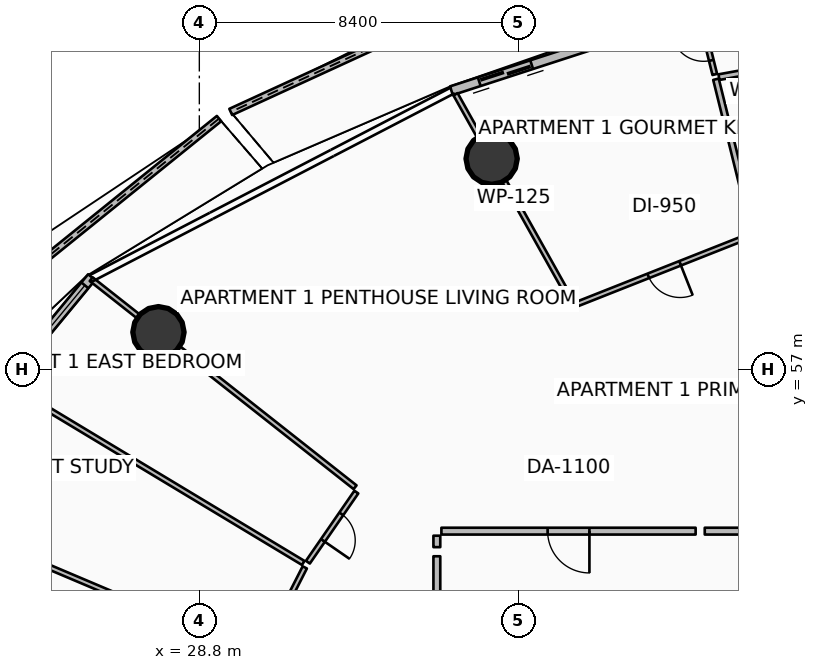
"""IFC4 building model, lengths in metres.
Left out: names, types, materials, properties, quantities, classifications, styles, units other than length and angle.
Written with IfcOpenShell. Run it as: python <this file> out.ifc"""

import sys

from ifc_helpers import new_model, si_unit, direction, frame, frame_2d, origin, origin_2d, place, context, subcontext, project, spatial, polyline, rectangle, circle, outline, extrude, element, fill, save


model = new_model("IFC4")
c1 = context("Model", 3, precision=1e-05, world=origin(), true_north=direction((0.0, 1.0)))
c2 = subcontext(c1, "Body", "Model", "MODEL_VIEW")
j1 = project(units=[si_unit("LENGTHUNIT", "METRE"), si_unit("PLANEANGLEUNIT", "RADIAN")], contexts=[c1])
p1 = place(None, origin())
s1 = spatial("IfcSite", under=j1, at=p1, CompositionType="ELEMENT")
p2 = place(p1, origin())
s2 = spatial("IfcBuilding", under=s1, at=p2, CompositionType="ELEMENT")
p3 = place(p2, frame((0.0, 0.0, 63.9)))
s3 = spatial("IfcBuildingStorey", under=s2, at=p3, CompositionType="ELEMENT", Elevation=63.9)
for number, where, z_axis, x_axis in (
    (1, (36.492, 62.55, 0.0), (0.0, 0.0, 1.0), (1.0, 0.0, 0.0)),
    (2, (27.724, 57.984, 0.0), (0.0, 0.0, 1.0), (1.0, 0.0, 0.0)),
):
    element("IfcColumn", number, at=place(p3, frame(where, z_axis=z_axis, x_axis=x_axis)), inside=s3, PredefinedType="COLUMN", context=c2, shape_type="SweptSolid", body=[
        extrude(circle(Radius=0.675, at=origin_2d()), origin(), (0.0, 0.0, 1.0), 3.5),
    ])
p4 = place(p3, frame((39.347, 68.246, 0.0), z_axis=(0.0, 0.0, 1.0), x_axis=(-0.908702116292, -0.417445162681, 0.0)))
e3 = element("IfcWall", 3, at=p4, inside=s3, PredefinedType="PARAPET", context=c2, shape_type="SweptSolid", body=[
    extrude(outline(polyline([(0.0, 0.0), (10.697, 0.0), (10.697, 1.233), (5.348, 1.418), (0.0, 1.632), (0.0, 0.0)])), frame((0.0, 0.09, 0.0), z_axis=(0.0, -1.0, 0.0), x_axis=(1.0, 0.0, 0.0)), (0.0, 0.0, 1.0), 0.18),
])
p5 = place(p3, frame((29.318, 63.605, 0.0), z_axis=(0.0, 0.0, 1.0), x_axis=(-0.778164801363, -0.628060141961, 0.0)))
e4 = element("IfcWall", 4, at=p5, inside=s3, PredefinedType="PARAPET", context=c2, shape_type="SweptSolid", body=[
    extrude(outline(polyline([(0.0, 0.0), (11.677, 0.0), (11.677, 1.148), (5.838, 1.127), (0.0, 1.224), (0.0, 0.0)])), frame((0.0, 0.09, 0.0), z_axis=(0.0, -1.0, 0.0), x_axis=(1.0, 0.0, 0.0)), (0.0, 0.0, 1.0), 0.18),
])
p6 = place(p3, frame((45.036, 67.458, 0.0), z_axis=(0.0, 0.0, 1.0), x_axis=(-0.951054679225, -0.309022648238, 0.0)))
e5 = element("IfcWall", 5, at=p6, inside=s3, PredefinedType="SOLIDWALL", context=c2, shape_type="SweptSolid", body=[
    extrude(rectangle(XDim=10.097, YDim=0.24, at=frame_2d((5.048, 0.0))), origin(), (0.0, 0.0, 1.0), 2.45),
])
p7 = place(p6, frame((7.877, 0.0, 0.0)))
e6 = element("IfcOpeningElement", 6, at=p7, cuts=e5, PredefinedType="OPENING", context=c2, shape_type="SweptSolid", body=[
    extrude(rectangle(XDim=1.45, YDim=2.15, at=frame_2d((0.725, 1.075))), frame((0.0, 0.13, 0.0), z_axis=(0.0, -1.0, 0.0), x_axis=(1.0, 0.0, 0.0)), (0.0, 0.0, 1.0), 0.26),
])
p8 = place(p6, frame((0.28, 0.0, 0.65)))
e7 = element("IfcOpeningElement", 7, at=p8, cuts=e5, PredefinedType="OPENING", context=c2, shape_type="SweptSolid", body=[
    extrude(rectangle(XDim=1.6, YDim=1.5, at=frame_2d((0.8, 0.75))), frame((0.0, 0.13, 0.0), z_axis=(0.0, -1.0, 0.0), x_axis=(1.0, 0.0, 0.0)), (0.0, 0.0, 1.0), 0.26),
])
p9 = place(p3, frame((25.967, 59.433, 0.0), z_axis=(0.0, 0.0, 1.0), x_axis=(-0.636674332663, -0.771132799281, 0.0)))
e8 = element("IfcWall", 8, at=p9, inside=s3, PredefinedType="SOLIDWALL", context=c2, shape_type="SweptSolid", body=[
    extrude(rectangle(XDim=11.851, YDim=0.24, at=frame_2d((5.926, 0.0))), origin(), (0.0, 0.0, 1.0), 2.45),
])
p10 = place(p9, frame((9.631, 0.0, 0.0)))
e9 = element("IfcOpeningElement", 9, at=p10, cuts=e8, PredefinedType="OPENING", context=c2, shape_type="SweptSolid", body=[
    extrude(rectangle(XDim=1.45, YDim=2.15, at=frame_2d((0.725, 1.075))), frame((0.0, 0.13, 0.0), z_axis=(0.0, -1.0, 0.0), x_axis=(1.0, 0.0, 0.0)), (0.0, 0.0, 1.0), 0.26),
])
p11 = place(p9, frame((0.28, 0.0, 0.65)))
e10 = element("IfcOpeningElement", 10, at=p11, cuts=e8, PredefinedType="OPENING", context=c2, shape_type="SweptSolid", body=[
    extrude(rectangle(XDim=1.6, YDim=1.5, at=frame_2d((0.8, 0.75))), frame((0.0, 0.13, 0.0), z_axis=(0.0, -1.0, 0.0), x_axis=(1.0, 0.0, 0.0)), (0.0, 0.0, 1.0), 0.26),
])
p12 = place(p3, frame((41.86, 52.75, 0.0), z_axis=(0.0, 0.0, 1.0), x_axis=(-1.0, 0.0, 0.0)))
e11 = element("IfcWall", 11, at=p12, inside=s3, PredefinedType="PARTITIONING", context=c2, shape_type="SweptSolid", body=[
    extrude(rectangle(XDim=6.69, YDim=0.18, at=frame_2d((3.345, 0.0))), origin(), (0.0, 0.0, 1.0), 2.867),
])
p13 = place(p12, frame((2.795, 0.0, 0.0)))
e12 = element("IfcOpeningElement", 12, at=p13, cuts=e11, PredefinedType="OPENING", context=c2, shape_type="SweptSolid", body=[
    extrude(rectangle(XDim=1.1, YDim=2.1, at=frame_2d((0.55, 1.05))), frame((0.0, 0.1, 0.0), z_axis=(0.0, -1.0, 0.0), x_axis=(1.0, 0.0, 0.0)), (0.0, 0.0, 1.0), 0.2),
])
p14 = place(p3, frame((35.05, 52.63, 0.0), z_axis=(0.0, 0.0, 1.0), x_axis=(0.0, -1.0, 0.0)))
e13 = element("IfcWall", 13, at=p14, inside=s3, PredefinedType="PARTITIONING", context=c2, shape_type="SweptSolid", body=[
    extrude(rectangle(XDim=0.301, YDim=0.18, at=frame_2d((0.15, 0.0))), origin(), (0.0, 0.0, 1.0), 2.867),
])
p15 = place(p3, frame((46.608, 52.75, 0.0), z_axis=(0.0, 0.0, 1.0), x_axis=(-1.0, 0.0, 0.0)))
e14 = element("IfcWall", 14, at=p15, inside=s3, PredefinedType="PARTITIONING", context=c2, shape_type="SweptSolid", body=[
    extrude(rectangle(XDim=4.508, YDim=0.18, at=frame_2d((2.254, 0.0))), origin(), (0.0, 0.0, 1.0), 2.867),
])
p16 = place(p3, frame((38.604, 58.778, 0.0), z_axis=(0.0, 0.0, 1.0), x_axis=(-0.488617606889, 0.872498042541, 0.0)))
e15 = element("IfcWall", 15, at=p16, inside=s3, PredefinedType="PARTITIONING", context=c2, shape_type="SweptSolid", body=[
    extrude(rectangle(XDim=6.266, YDim=0.125, at=frame_2d((3.133, 0.0))), origin(), (0.0, 0.0, 1.0), 2.867),
])
p17 = place(p3, frame((45.156, 65.184, 0.0), z_axis=(0.0, 0.0, 1.0), x_axis=(-0.983792433056, -0.179311038873, 0.0)))
e16 = element("IfcWall", 16, at=p17, inside=s3, PredefinedType="PARTITIONING", context=c2, shape_type="SweptSolid", body=[
    extrude(rectangle(XDim=2.726, YDim=0.15, at=frame_2d((1.363, 0.0))), origin(), (0.0, 0.0, 1.0), 2.867),
])
p18 = place(p3, frame((43.381, 60.657, 0.0), z_axis=(0.0, 0.0, 1.0), x_axis=(-0.240281337946, 0.97070329073, 0.0)))
e17 = element("IfcWall", 17, at=p18, inside=s3, PredefinedType="PARTITIONING", context=c2, shape_type="SweptSolid", body=[
    extrude(rectangle(XDim=4.104, YDim=0.15, at=frame_2d((2.052, 0.0))), origin(), (0.0, 0.0, 1.0), 2.94),
])
p19 = place(p3, frame((42.364, 64.767, 0.0), z_axis=(0.0, 0.0, 1.0), x_axis=(-0.240399183991, 0.970674112324, 0.0)))
e18 = element("IfcWall", 18, at=p19, inside=s3, PredefinedType="PARTITIONING", context=c2, shape_type="SweptSolid", body=[
    extrude(rectangle(XDim=1.614, YDim=0.125, at=frame_2d((0.807, 0.0))), origin(), (0.0, 0.0, 1.0), 2.94),
])
p20 = place(p19, frame((0.382, 0.0, 0.0)))
e19 = element("IfcOpeningElement", 19, at=p20, cuts=e18, PredefinedType="OPENING", context=c2, shape_type="SweptSolid", body=[
    extrude(rectangle(XDim=0.85, YDim=2.06, at=frame_2d((0.425, 1.03))), frame((0.0, 0.073, 0.0), z_axis=(0.0, -1.0, 0.0), x_axis=(1.0, 0.0, 0.0)), (0.0, 0.0, 1.0), 0.145),
])
p21 = place(p3, frame((43.319, 60.536, 0.0), z_axis=(0.0, 0.0, 1.0), x_axis=(-0.929910978534, -0.367784681576, 0.0)))
e20 = element("IfcWall", 20, at=p21, inside=s3, PredefinedType="PARTITIONING", context=c2, shape_type="SweptSolid", body=[
    extrude(rectangle(XDim=4.918, YDim=0.125, at=frame_2d((2.459, 0.0))), origin(), (0.0, 0.0, 1.0), 2.867),
])
p22 = place(p21, frame((2.009, 0.0, 0.0)))
e21 = element("IfcOpeningElement", 21, at=p22, cuts=e20, PredefinedType="OPENING", context=c2, shape_type="SweptSolid", body=[
    extrude(rectangle(XDim=0.9, YDim=2.08, at=frame_2d((0.45, 1.04))), frame((0.0, 0.073, 0.0), z_axis=(0.0, -1.0, 0.0), x_axis=(1.0, 0.0, 0.0)), (0.0, 0.0, 1.0), 0.145),
])
p23 = place(p3, frame((35.05, 52.089, 0.0), z_axis=(0.0, 0.0, 1.0), x_axis=(0.0, -1.0, 0.0)))
e22 = element("IfcWall", 22, at=p23, inside=s3, PredefinedType="PARTITIONING", context=c2, shape_type="SweptSolid", body=[
    extrude(rectangle(XDim=6.317, YDim=0.18, at=frame_2d((3.158, 0.0))), origin(), (0.0, 0.0, 1.0), 2.867),
])
p24 = place(p3, frame((32.898, 53.905, 0.0), z_axis=(0.0, 0.0, 1.0), x_axis=(-0.78532854108, 0.619079221558, 0.0)))
e23 = element("IfcWall", 23, at=p24, inside=s3, PredefinedType="PARTITIONING", context=c2, shape_type="SweptSolid", body=[
    extrude(rectangle(XDim=8.842, YDim=0.125, at=frame_2d((4.421, 0.0))), origin(), (0.0, 0.0, 1.0), 2.867),
])
p25 = place(p3, frame((31.534, 51.913, 0.0), z_axis=(0.0, 0.0, 1.0), x_axis=(-0.856706990958, 0.515803384676, 0.0)))
e24 = element("IfcWall", 24, at=p25, inside=s3, PredefinedType="PARTITIONING", context=c2, shape_type="SweptSolid", body=[
    extrude(rectangle(XDim=9.057, YDim=0.125, at=frame_2d((4.528, 0.0))), origin(), (0.0, 0.0, 1.0), 2.94),
])
p26 = place(p3, frame((30.301, 49.494, 0.0), z_axis=(0.0, 0.0, 1.0), x_axis=(-0.920840746031, 0.389938867579, 0.0)))
e25 = element("IfcWall", 25, at=p26, inside=s3, PredefinedType="PARTITIONING", context=c2, shape_type="SweptSolid", body=[
    extrude(rectangle(XDim=9.966, YDim=0.125, at=frame_2d((4.983, 0.0))), origin(), (0.0, 0.0, 1.0), 2.94),
])
p27 = place(p3, frame((32.931, 53.778, 0.0), z_axis=(0.0, 0.0, 1.0), x_axis=(-0.568541738061, -0.822654418382, 0.0)))
e26 = element("IfcWall", 26, at=p27, inside=s3, PredefinedType="PARTITIONING", context=c2, shape_type="SweptSolid", body=[
    extrude(rectangle(XDim=2.242, YDim=0.125, at=frame_2d((1.121, 0.0))), origin(), (0.0, 0.0, 1.0), 2.867),
])
p28 = place(p27, frame((0.696, 0.0, 0.0)))
e27 = element("IfcOpeningElement", 27, at=p28, cuts=e26, PredefinedType="OPENING", context=c2, shape_type="SweptSolid", body=[
    extrude(rectangle(XDim=0.85, YDim=2.06, at=frame_2d((0.425, 1.03))), frame((0.0, 0.073, 0.0), z_axis=(0.0, -1.0, 0.0), x_axis=(1.0, 0.0, 0.0)), (0.0, 0.0, 1.0), 0.145),
])
p29 = place(p3, frame((31.575, 51.796, 0.0), z_axis=(0.0, 0.0, 1.0), x_axis=(-0.454037986735, -0.890982326762, 0.0)))
e28 = element("IfcWall", 28, at=p29, inside=s3, PredefinedType="PARTITIONING", context=c2, shape_type="SweptSolid", body=[
    extrude(rectangle(XDim=2.542, YDim=0.125, at=frame_2d((1.271, 0.0))), origin(), (0.0, 0.0, 1.0), 2.94),
])
p30 = place(p29, frame((0.846, 0.0, 0.0)))
e29 = element("IfcOpeningElement", 29, at=p30, cuts=e28, PredefinedType="OPENING", context=c2, shape_type="SweptSolid", body=[
    extrude(rectangle(XDim=0.85, YDim=2.06, at=frame_2d((0.425, 1.03))), frame((0.0, 0.073, 0.0), z_axis=(0.0, -1.0, 0.0), x_axis=(1.0, 0.0, 0.0)), (0.0, 0.0, 1.0), 0.145),
])
p31 = place(p7, origin())
e30 = element("IfcDoor", 30, at=p31, inside=s3, OperationType="DOUBLE_DOOR_SLIDING", PredefinedType="DOOR", context=c2, shape_type="SweptSolid", body=[
    extrude(rectangle(XDim=1.45, YDim=2.15, at=frame_2d((0.725, 1.075))), frame((0.0, 0.025, 0.0), z_axis=(0.0, -1.0, 0.0), x_axis=(1.0, 0.0, 0.0)), (0.0, 0.0, 1.0), 0.05),
])
fill(e6, e30)
p32 = place(p11, origin())
e31 = element("IfcWindow", 31, at=p32, inside=s3, PartitioningType="SINGLE_PANEL", PredefinedType="WINDOW", context=c2, shape_type="SweptSolid", body=[
    extrude(rectangle(XDim=1.6, YDim=1.5, at=frame_2d((0.8, 0.75))), frame((0.0, 0.03, 0.0), z_axis=(0.0, -1.0, 0.0), x_axis=(1.0, 0.0, 0.0)), (0.0, 0.0, 1.0), 0.06),
])
fill(e10, e31)
p33 = place(p13, origin())
e32 = element("IfcDoor", 32, at=p33, inside=s3, OperationType="SINGLE_SWING_LEFT", PredefinedType="DOOR", context=c2, shape_type="SweptSolid", body=[
    extrude(rectangle(XDim=1.1, YDim=2.1, at=frame_2d((0.55, 1.05))), frame((0.0, 0.025, 0.0), z_axis=(0.0, -1.0, 0.0), x_axis=(1.0, 0.0, 0.0)), (0.0, 0.0, 1.0), 0.05),
])
fill(e12, e32)
p34 = place(p20, origin())
e33 = element("IfcDoor", 33, at=p34, inside=s3, OperationType="SINGLE_SWING_RIGHT", PredefinedType="DOOR", context=c2, shape_type="SweptSolid", body=[
    extrude(rectangle(XDim=0.85, YDim=2.06, at=frame_2d((0.425, 1.03))), frame((0.0, 0.025, 0.0), z_axis=(0.0, -1.0, 0.0), x_axis=(1.0, 0.0, 0.0)), (0.0, 0.0, 1.0), 0.05),
])
fill(e19, e33)
p35 = place(p22, origin())
e34 = element("IfcDoor", 34, at=p35, inside=s3, OperationType="SINGLE_SWING_LEFT", PredefinedType="DOOR", context=c2, shape_type="SweptSolid", body=[
    extrude(rectangle(XDim=0.9, YDim=2.08, at=frame_2d((0.45, 1.04))), frame((0.0, 0.025, 0.0), z_axis=(0.0, -1.0, 0.0), x_axis=(1.0, 0.0, 0.0)), (0.0, 0.0, 1.0), 0.05),
])
fill(e21, e34)
p36 = place(p28, origin())
e35 = element("IfcDoor", 35, at=p36, inside=s3, OperationType="SINGLE_SWING_RIGHT", PredefinedType="DOOR", context=c2, shape_type="SweptSolid", body=[
    extrude(rectangle(XDim=0.85, YDim=2.06, at=frame_2d((0.425, 1.03))), frame((0.0, 0.025, 0.0), z_axis=(0.0, -1.0, 0.0), x_axis=(1.0, 0.0, 0.0)), (0.0, 0.0, 1.0), 0.05),
])
fill(e27, e35)
save(model, sys.argv[1])
